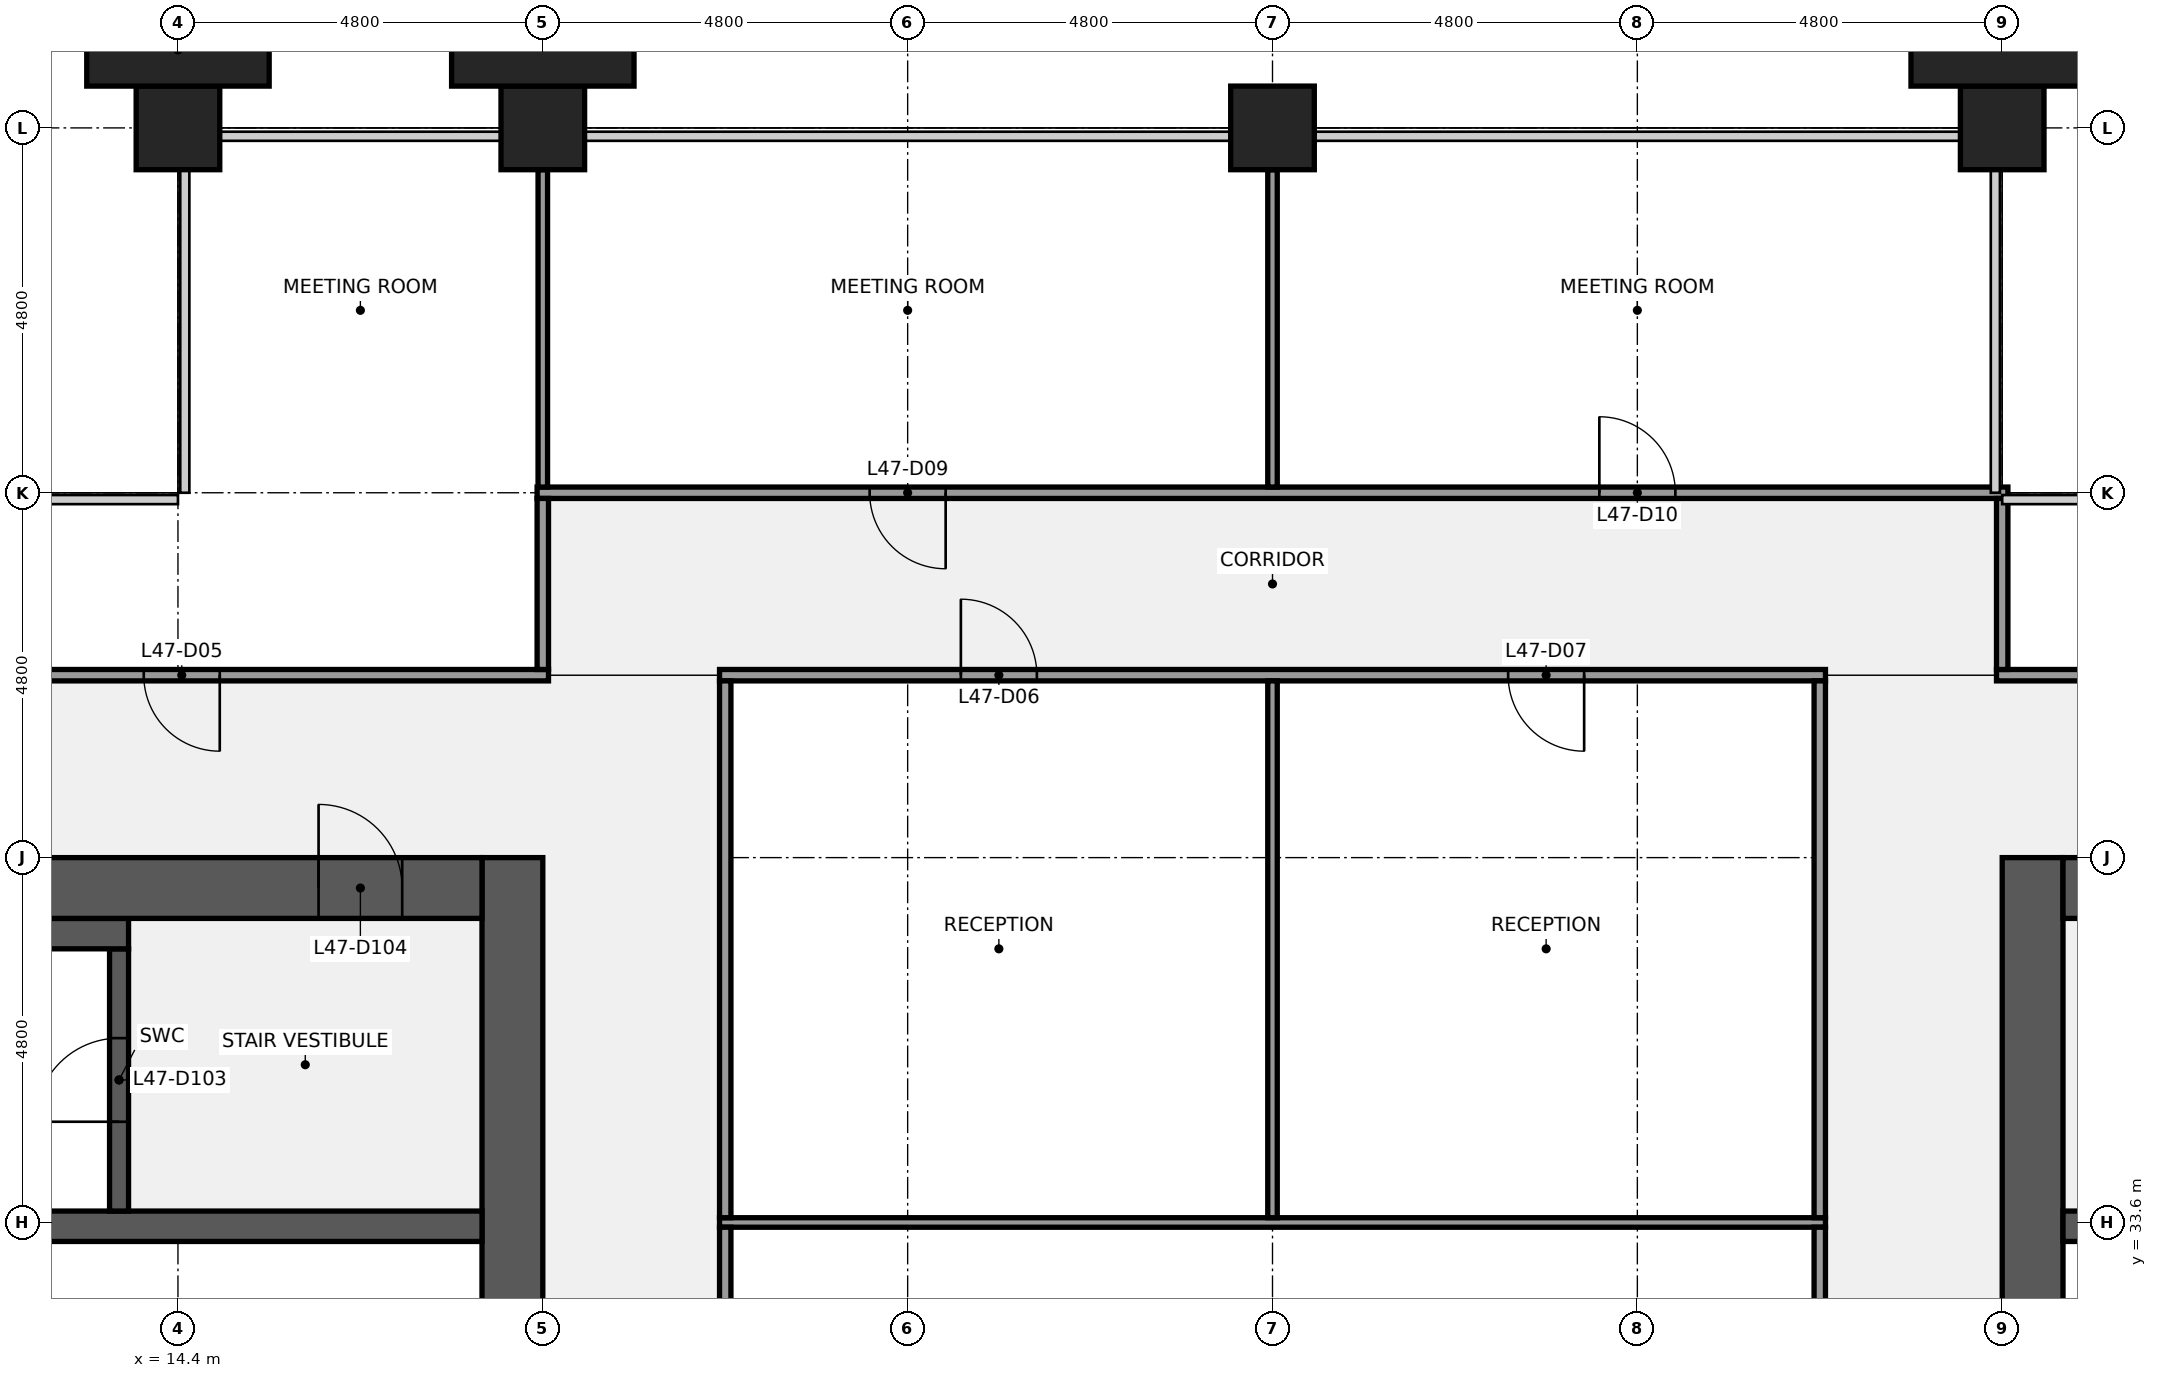
"""IFC4 building model, lengths in metres.
Left out: names, types, materials, properties, quantities, classifications, styles, units other than length and angle.
Written with IfcOpenShell. Run it as: python <this file> out.ifc"""

import sys

from ifc_helpers import new_model, si_unit, direction, frame, frame_2d, origin, origin_2d, place, context, subcontext, project, spatial, rectangle, extrude, element, fill, save


model = new_model("IFC4")
c1 = context("Model", 3, precision=1e-05, world=origin(), true_north=direction((0.0, 1.0)))
c2 = subcontext(c1, "Body", "Model", "MODEL_VIEW")
j1 = project(units=[si_unit("LENGTHUNIT", "METRE"), si_unit("PLANEANGLEUNIT", "RADIAN")], contexts=[c1])
p1 = place(None, origin())
s1 = spatial("IfcSite", under=j1, at=p1, CompositionType="ELEMENT")
p2 = place(p1, origin())
s2 = spatial("IfcBuilding", under=s1, at=p2, CompositionType="ELEMENT")
p3 = place(p2, frame((0.0, 0.0, 217.2)))
s3 = spatial("IfcBuildingStorey", under=s2, at=p3, CompositionType="ELEMENT", Elevation=217.2)
for number, where, z_axis, x_axis in (
    (1, (14.4, 48.0, 0.0), (0.0, 0.0, 1.0), (1.0, 0.0, 0.0)),
    (2, (19.2, 48.0, 0.0), (0.0, 0.0, 1.0), (1.0, 0.0, 0.0)),
    (3, (28.8, 48.0, 0.0), (0.0, 0.0, 1.0), (1.0, 0.0, 0.0)),
    (4, (38.4, 48.0, 0.0), (0.0, 0.0, 1.0), (1.0, 0.0, 0.0)),
):
    element("IfcColumn", number, at=place(p3, frame(where, z_axis=z_axis, x_axis=x_axis)), inside=s3, PredefinedType="COLUMN", context=c2, shape_type="SweptSolid", body=[
        extrude(rectangle(XDim=1.1, YDim=1.1, at=origin_2d()), origin(), (0.0, 0.0, 1.0), 4.0),
    ])
p4 = place(p3, frame((18.8, 38.4, 0.0), z_axis=(0.0, 0.0, 1.0), x_axis=(0.0, -1.0, 0.0)))
e5 = element("IfcWall", 5, at=p4, inside=s3, PredefinedType="SHEAR", context=c2, shape_type="SweptSolid", body=[
    extrude(rectangle(XDim=28.8, YDim=0.8, at=frame_2d((14.4, 0.0))), origin(), (0.0, 0.0, 1.0), 3.84),
])
p5 = place(p4, frame((18.3, 0.0, 0.0)))
e6 = element("IfcOpeningElement", 6, at=p5, cuts=e5, PredefinedType="OPENING", context=c2, shape_type="SweptSolid", body=[
    extrude(rectangle(XDim=1.8, YDim=2.1, at=frame_2d((0.9, 1.05))), frame((0.0, 0.41, 0.0), z_axis=(0.0, -1.0, 0.0), x_axis=(1.0, 0.0, 0.0)), (0.0, 0.0, 1.0), 0.82),
])
p6 = place(p4, frame((8.7, 0.0, 0.0)))
e7 = element("IfcOpeningElement", 7, at=p6, cuts=e5, PredefinedType="OPENING", context=c2, shape_type="SweptSolid", body=[
    extrude(rectangle(XDim=1.8, YDim=2.1, at=frame_2d((0.9, 1.05))), frame((0.0, 0.41, 0.0), z_axis=(0.0, -1.0, 0.0), x_axis=(1.0, 0.0, 0.0)), (0.0, 0.0, 1.0), 0.82),
])
p7 = place(p3, frame((0.8, 33.55, 0.0), z_axis=(0.0, 0.0, 1.0), x_axis=(1.0, 0.0, 0.0)))
e8 = element("IfcWall", 8, at=p7, inside=s3, PredefinedType="SHEAR", context=c2, shape_type="SweptSolid", body=[
    extrude(rectangle(XDim=17.6, YDim=0.4, at=frame_2d((8.8, 0.0))), origin(), (0.0, 0.0, 1.0), 3.84),
])
p8 = place(p3, frame((13.625, 33.75, 0.0), z_axis=(0.0, 0.0, 1.0), x_axis=(0.0, 1.0, 0.0)))
e9 = element("IfcWall", 9, at=p8, inside=s3, PredefinedType="SHEAR", context=c2, shape_type="SweptSolid", body=[
    extrude(rectangle(XDim=3.45, YDim=0.25, at=frame_2d((1.725, 0.0))), origin(), (0.0, 0.0, 1.0), 3.84),
])
p9 = place(p8, frame((1.175, 0.0, 0.0)))
e10 = element("IfcOpeningElement", 10, at=p9, cuts=e9, PredefinedType="OPENING", context=c2, shape_type="SweptSolid", body=[
    extrude(rectangle(XDim=1.1, YDim=2.1, at=frame_2d((0.55, 1.05))), frame((0.0, 0.135, 0.0), z_axis=(0.0, -1.0, 0.0), x_axis=(1.0, 0.0, 0.0)), (0.0, 0.0, 1.0), 0.27),
])
p10 = place(p3, frame((9.6, 37.4, 0.0), z_axis=(0.0, 0.0, 1.0), x_axis=(1.0, 0.0, 0.0)))
e11 = element("IfcWall", 11, at=p10, inside=s3, PredefinedType="SHEAR", context=c2, shape_type="SweptSolid", body=[
    extrude(rectangle(XDim=4.15, YDim=0.4, at=frame_2d((2.075, 0.0))), origin(), (0.0, 0.0, 1.0), 3.84),
])
p11 = place(p3, frame((9.6, 38.0, 0.0), z_axis=(0.0, 0.0, 1.0), x_axis=(1.0, 0.0, 0.0)))
e12 = element("IfcWall", 12, at=p11, inside=s3, PredefinedType="SHEAR", context=c2, shape_type="SweptSolid", body=[
    extrude(rectangle(XDim=8.8, YDim=0.8, at=frame_2d((4.4, 0.0))), origin(), (0.0, 0.0, 1.0), 3.84),
])
p12 = place(p11, frame((6.65, 0.0, 0.0)))
e13 = element("IfcOpeningElement", 13, at=p12, cuts=e12, PredefinedType="OPENING", context=c2, shape_type="SweptSolid", body=[
    extrude(rectangle(XDim=1.1, YDim=2.1, at=frame_2d((0.55, 1.05))), frame((0.0, 0.41, 0.0), z_axis=(0.0, -1.0, 0.0), x_axis=(1.0, 0.0, 0.0)), (0.0, 0.0, 1.0), 0.82),
])
p13 = place(p3, frame((38.8, 9.6, 0.0), z_axis=(0.0, 0.0, 1.0), x_axis=(0.0, 1.0, 0.0)))
e14 = element("IfcWall", 14, at=p13, inside=s3, PredefinedType="SHEAR", context=c2, shape_type="SweptSolid", body=[
    extrude(rectangle(XDim=28.8, YDim=0.8, at=frame_2d((14.4, 0.0))), origin(), (0.0, 0.0, 1.0), 3.84),
])
p14 = place(p13, frame((8.7, 0.0, 0.0)))
e15 = element("IfcOpeningElement", 15, at=p14, cuts=e14, PredefinedType="OPENING", context=c2, shape_type="SweptSolid", body=[
    extrude(rectangle(XDim=1.8, YDim=2.1, at=frame_2d((0.9, 1.05))), frame((0.0, 0.41, 0.0), z_axis=(0.0, -1.0, 0.0), x_axis=(1.0, 0.0, 0.0)), (0.0, 0.0, 1.0), 0.82),
])
p15 = place(p13, frame((18.3, 0.0, 0.0)))
e16 = element("IfcOpeningElement", 16, at=p15, cuts=e14, PredefinedType="OPENING", context=c2, shape_type="SweptSolid", body=[
    extrude(rectangle(XDim=1.8, YDim=2.1, at=frame_2d((0.9, 1.05))), frame((0.0, 0.41, 0.0), z_axis=(0.0, -1.0, 0.0), x_axis=(1.0, 0.0, 0.0)), (0.0, 0.0, 1.0), 0.82),
])
p16 = place(p3, frame((39.2, 33.55, 0.0), z_axis=(0.0, 0.0, 1.0), x_axis=(1.0, 0.0, 0.0)))
e17 = element("IfcWall", 17, at=p16, inside=s3, PredefinedType="SHEAR", context=c2, shape_type="SweptSolid", body=[
    extrude(rectangle(XDim=17.6, YDim=0.4, at=frame_2d((8.8, 0.0))), origin(), (0.0, 0.0, 1.0), 3.84),
])
p17 = place(p3, frame((39.2, 38.0, 0.0), z_axis=(0.0, 0.0, 1.0), x_axis=(1.0, 0.0, 0.0)))
e18 = element("IfcWall", 18, at=p17, inside=s3, PredefinedType="SHEAR", context=c2, shape_type="SweptSolid", body=[
    extrude(rectangle(XDim=8.8, YDim=0.8, at=frame_2d((4.4, 0.0))), origin(), (0.0, 0.0, 1.0), 3.84),
])
p18 = place(p17, frame((1.05, 0.0, 0.0)))
e19 = element("IfcOpeningElement", 19, at=p18, cuts=e18, PredefinedType="OPENING", context=c2, shape_type="SweptSolid", body=[
    extrude(rectangle(XDim=1.1, YDim=2.1, at=frame_2d((0.55, 1.05))), frame((0.0, 0.41, 0.0), z_axis=(0.0, -1.0, 0.0), x_axis=(1.0, 0.0, 0.0)), (0.0, 0.0, 1.0), 0.82),
])
p19 = place(p3, frame((21.525, 33.6, 0.0), z_axis=(0.0, 0.0, 1.0), x_axis=(1.0, 0.0, 0.0)))
e20 = element("IfcWall", 20, at=p19, inside=s3, PredefinedType="PARTITIONING", context=c2, shape_type="SweptSolid", body=[
    extrude(rectangle(XDim=14.55, YDim=0.125, at=frame_2d((7.275, 0.0))), origin(), (0.0, 0.0, 1.0), 2.849),
])
p20 = place(p3, frame((9.7, 40.8, 0.0), z_axis=(0.0, 0.0, 1.0), x_axis=(1.0, 0.0, 0.0)))
e21 = element("IfcWall", 21, at=p20, inside=s3, PredefinedType="PARTITIONING", context=c2, shape_type="SweptSolid", body=[
    extrude(rectangle(XDim=9.575, YDim=0.15, at=frame_2d((4.788, 0.0))), origin(), (0.0, 0.0, 1.0), 2.849),
])
p21 = place(p20, frame((4.25, 0.0, 0.0)))
e22 = element("IfcOpeningElement", 22, at=p21, cuts=e21, PredefinedType="OPENING", context=c2, shape_type="SweptSolid", body=[
    extrude(rectangle(XDim=1.0, YDim=2.1, at=frame_2d((0.5, 1.05))), frame((0.0, 0.085, 0.0), z_axis=(0.0, -1.0, 0.0), x_axis=(1.0, 0.0, 0.0)), (0.0, 0.0, 1.0), 0.17),
])
p22 = place(p3, frame((21.525, 40.8, 0.0), z_axis=(0.0, 0.0, 1.0), x_axis=(1.0, 0.0, 0.0)))
e23 = element("IfcWall", 23, at=p22, inside=s3, PredefinedType="PARTITIONING", context=c2, shape_type="SweptSolid", body=[
    extrude(rectangle(XDim=14.55, YDim=0.15, at=frame_2d((7.275, 0.0))), origin(), (0.0, 0.0, 1.0), 2.849),
])
p23 = place(p22, frame((3.175, 0.0, 0.0)))
e24 = element("IfcOpeningElement", 24, at=p23, cuts=e23, PredefinedType="OPENING", context=c2, shape_type="SweptSolid", body=[
    extrude(rectangle(XDim=1.0, YDim=2.1, at=frame_2d((0.5, 1.05))), frame((0.0, 0.085, 0.0), z_axis=(0.0, -1.0, 0.0), x_axis=(1.0, 0.0, 0.0)), (0.0, 0.0, 1.0), 0.17),
])
p24 = place(p22, frame((10.375, 0.0, 0.0)))
e25 = element("IfcOpeningElement", 25, at=p24, cuts=e23, PredefinedType="OPENING", context=c2, shape_type="SweptSolid", body=[
    extrude(rectangle(XDim=1.0, YDim=2.1, at=frame_2d((0.5, 1.05))), frame((0.0, 0.085, 0.0), z_axis=(0.0, -1.0, 0.0), x_axis=(1.0, 0.0, 0.0)), (0.0, 0.0, 1.0), 0.17),
])
p25 = place(p3, frame((38.325, 40.8, 0.0), z_axis=(0.0, 0.0, 1.0), x_axis=(1.0, 0.0, 0.0)))
e26 = element("IfcWall", 26, at=p25, inside=s3, PredefinedType="PARTITIONING", context=c2, shape_type="SweptSolid", body=[
    extrude(rectangle(XDim=9.575, YDim=0.15, at=frame_2d((4.788, 0.0))), origin(), (0.0, 0.0, 1.0), 2.849),
])
p26 = place(p25, frame((4.325, 0.0, 0.0)))
e27 = element("IfcOpeningElement", 27, at=p26, cuts=e26, PredefinedType="OPENING", context=c2, shape_type="SweptSolid", body=[
    extrude(rectangle(XDim=1.0, YDim=2.1, at=frame_2d((0.5, 1.05))), frame((0.0, 0.085, 0.0), z_axis=(0.0, -1.0, 0.0), x_axis=(1.0, 0.0, 0.0)), (0.0, 0.0, 1.0), 0.17),
])
p27 = place(p3, frame((19.125, 43.2, 0.0), z_axis=(0.0, 0.0, 1.0), x_axis=(1.0, 0.0, 0.0)))
e28 = element("IfcWall", 28, at=p27, inside=s3, PredefinedType="PARTITIONING", context=c2, shape_type="SweptSolid", body=[
    extrude(rectangle(XDim=19.35, YDim=0.15, at=frame_2d((9.675, 0.0))), origin(), (0.0, 0.0, 1.0), 2.849),
])
p28 = place(p27, frame((4.375, 0.0, 0.0)))
e29 = element("IfcOpeningElement", 29, at=p28, cuts=e28, PredefinedType="OPENING", context=c2, shape_type="SweptSolid", body=[
    extrude(rectangle(XDim=1.0, YDim=2.1, at=frame_2d((0.5, 1.05))), frame((0.0, 0.085, 0.0), z_axis=(0.0, -1.0, 0.0), x_axis=(1.0, 0.0, 0.0)), (0.0, 0.0, 1.0), 0.17),
])
p29 = place(p27, frame((13.975, 0.0, 0.0)))
e30 = element("IfcOpeningElement", 30, at=p29, cuts=e28, PredefinedType="OPENING", context=c2, shape_type="SweptSolid", body=[
    extrude(rectangle(XDim=1.0, YDim=2.1, at=frame_2d((0.5, 1.05))), frame((0.0, 0.085, 0.0), z_axis=(0.0, -1.0, 0.0), x_axis=(1.0, 0.0, 0.0)), (0.0, 0.0, 1.0), 0.17),
])
p30 = place(p3, frame((19.2, 43.275, 0.0), z_axis=(0.0, 0.0, 1.0), x_axis=(0.0, 1.0, 0.0)))
e31 = element("IfcWall", 31, at=p30, inside=s3, PredefinedType="PARTITIONING", context=c2, shape_type="SweptSolid", body=[
    extrude(rectangle(XDim=4.175, YDim=0.125, at=frame_2d((2.087, 0.0))), origin(), (0.0, 0.0, 1.0), 2.849),
])
p31 = place(p3, frame((19.2, 40.875, 0.0), z_axis=(0.0, 0.0, 1.0), x_axis=(0.0, 1.0, 0.0)))
e32 = element("IfcWall", 32, at=p31, inside=s3, PredefinedType="PARTITIONING", context=c2, shape_type="SweptSolid", body=[
    extrude(rectangle(XDim=2.25, YDim=0.15, at=frame_2d((1.125, 0.0))), origin(), (0.0, 0.0, 1.0), 2.849),
])
p32 = place(p3, frame((21.6, 24.062, 0.0), z_axis=(0.0, 0.0, 1.0), x_axis=(0.0, 1.0, 0.0)))
e33 = element("IfcWall", 33, at=p32, inside=s3, PredefinedType="PARTITIONING", context=c2, shape_type="SweptSolid", body=[
    extrude(rectangle(XDim=9.475, YDim=0.15, at=frame_2d((4.738, 0.0))), origin(), (0.0, 0.0, 1.0), 2.849),
])
p33 = place(p32, frame((4.238, 0.0, 0.0)))
e34 = element("IfcOpeningElement", 34, at=p33, cuts=e33, PredefinedType="OPENING", context=c2, shape_type="SweptSolid", body=[
    extrude(rectangle(XDim=1.0, YDim=2.1, at=frame_2d((0.5, 1.05))), frame((0.0, 0.085, 0.0), z_axis=(0.0, -1.0, 0.0), x_axis=(1.0, 0.0, 0.0)), (0.0, 0.0, 1.0), 0.17),
])
p34 = place(p3, frame((21.6, 33.663, 0.0), z_axis=(0.0, 0.0, 1.0), x_axis=(0.0, 1.0, 0.0)))
e35 = element("IfcWall", 35, at=p34, inside=s3, PredefinedType="PARTITIONING", context=c2, shape_type="SweptSolid", body=[
    extrude(rectangle(XDim=7.062, YDim=0.15, at=frame_2d((3.531, 0.0))), origin(), (0.0, 0.0, 1.0), 2.849),
])
p35 = place(p3, frame((28.8, 33.663, 0.0), z_axis=(0.0, 0.0, 1.0), x_axis=(0.0, 1.0, 0.0)))
e36 = element("IfcWall", 36, at=p35, inside=s3, PredefinedType="PARTITIONING", context=c2, shape_type="SweptSolid", body=[
    extrude(rectangle(XDim=7.062, YDim=0.125, at=frame_2d((3.531, 0.0))), origin(), (0.0, 0.0, 1.0), 2.849),
])
p36 = place(p3, frame((28.8, 43.275, 0.0), z_axis=(0.0, 0.0, 1.0), x_axis=(0.0, 1.0, 0.0)))
e37 = element("IfcWall", 37, at=p36, inside=s3, PredefinedType="PARTITIONING", context=c2, shape_type="SweptSolid", body=[
    extrude(rectangle(XDim=4.175, YDim=0.125, at=frame_2d((2.087, 0.0))), origin(), (0.0, 0.0, 1.0), 2.849),
])
p37 = place(p3, frame((36.0, 24.062, 0.0), z_axis=(0.0, 0.0, 1.0), x_axis=(0.0, 1.0, 0.0)))
e38 = element("IfcWall", 38, at=p37, inside=s3, PredefinedType="PARTITIONING", context=c2, shape_type="SweptSolid", body=[
    extrude(rectangle(XDim=9.475, YDim=0.15, at=frame_2d((4.738, 0.0))), origin(), (0.0, 0.0, 1.0), 2.849),
])
p38 = place(p3, frame((36.0, 33.663, 0.0), z_axis=(0.0, 0.0, 1.0), x_axis=(0.0, 1.0, 0.0)))
e39 = element("IfcWall", 39, at=p38, inside=s3, PredefinedType="PARTITIONING", context=c2, shape_type="SweptSolid", body=[
    extrude(rectangle(XDim=7.062, YDim=0.15, at=frame_2d((3.531, 0.0))), origin(), (0.0, 0.0, 1.0), 2.849),
])
p39 = place(p3, frame((38.4, 40.875, 0.0), z_axis=(0.0, 0.0, 1.0), x_axis=(0.0, 1.0, 0.0)))
e40 = element("IfcWall", 40, at=p39, inside=s3, PredefinedType="PARTITIONING", context=c2, shape_type="SweptSolid", body=[
    extrude(rectangle(XDim=2.25, YDim=0.15, at=frame_2d((1.125, 0.0))), origin(), (0.0, 0.0, 1.0), 2.849),
])
for number, where, z_axis, x_axis in (
    (41, (14.4, 49.025, 0.0), (0.0, 0.0, 1.0), (1.0, 0.0, 0.0)),
    (42, (19.2, 49.025, 0.0), (0.0, 0.0, 1.0), (1.0, 0.0, 0.0)),
    (43, (38.4, 49.025, 0.0), (0.0, 0.0, 1.0), (1.0, 0.0, 0.0)),
):
    element("IfcColumn", number, at=place(p3, frame(where, z_axis=z_axis, x_axis=x_axis)), inside=s3, PredefinedType="PILASTER", context=c2, shape_type="SweptSolid", body=[
        extrude(rectangle(XDim=2.4, YDim=0.95, at=origin_2d()), origin(), (0.0, 0.0, 1.0), 4.0),
    ])
p40 = place(p9, origin())
e44 = element("IfcDoor", 44, at=p40, inside=s3, OperationType="SINGLE_SWING_LEFT", PredefinedType="DOOR", context=c2, shape_type="SweptSolid", body=[
    extrude(rectangle(XDim=1.1, YDim=2.1, at=frame_2d((0.55, 1.05))), frame((0.0, 0.025, 0.0), z_axis=(0.0, -1.0, 0.0), x_axis=(1.0, 0.0, 0.0)), (0.0, 0.0, 1.0), 0.05),
])
fill(e10, e44)
p41 = place(p12, origin())
e45 = element("IfcDoor", 45, at=p41, inside=s3, OperationType="SINGLE_SWING_LEFT", PredefinedType="DOOR", context=c2, shape_type="SweptSolid", body=[
    extrude(rectangle(XDim=1.1, YDim=2.1, at=frame_2d((0.55, 1.05))), frame((0.0, 0.025, 0.0), z_axis=(0.0, -1.0, 0.0), x_axis=(1.0, 0.0, 0.0)), (0.0, 0.0, 1.0), 0.05),
])
fill(e13, e45)
p42 = place(p21, origin())
e46 = element("IfcDoor", 46, at=p42, inside=s3, OperationType="SINGLE_SWING_RIGHT", PredefinedType="DOOR", context=c2, shape_type="SweptSolid", body=[
    extrude(rectangle(XDim=1.0, YDim=2.1, at=frame_2d((0.5, 1.05))), frame((0.0, 0.025, 0.0), z_axis=(0.0, -1.0, 0.0), x_axis=(1.0, 0.0, 0.0)), (0.0, 0.0, 1.0), 0.05),
])
fill(e22, e46)
p43 = place(p23, origin())
e47 = element("IfcDoor", 47, at=p43, inside=s3, OperationType="SINGLE_SWING_LEFT", PredefinedType="DOOR", context=c2, shape_type="SweptSolid", body=[
    extrude(rectangle(XDim=1.0, YDim=2.1, at=frame_2d((0.5, 1.05))), frame((0.0, 0.025, 0.0), z_axis=(0.0, -1.0, 0.0), x_axis=(1.0, 0.0, 0.0)), (0.0, 0.0, 1.0), 0.05),
])
fill(e24, e47)
p44 = place(p24, origin())
e48 = element("IfcDoor", 48, at=p44, inside=s3, OperationType="SINGLE_SWING_RIGHT", PredefinedType="DOOR", context=c2, shape_type="SweptSolid", body=[
    extrude(rectangle(XDim=1.0, YDim=2.1, at=frame_2d((0.5, 1.05))), frame((0.0, 0.025, 0.0), z_axis=(0.0, -1.0, 0.0), x_axis=(1.0, 0.0, 0.0)), (0.0, 0.0, 1.0), 0.05),
])
fill(e25, e48)
p45 = place(p28, origin())
e49 = element("IfcDoor", 49, at=p45, inside=s3, OperationType="SINGLE_SWING_RIGHT", PredefinedType="DOOR", context=c2, shape_type="SweptSolid", body=[
    extrude(rectangle(XDim=1.0, YDim=2.1, at=frame_2d((0.5, 1.05))), frame((0.0, 0.025, 0.0), z_axis=(0.0, -1.0, 0.0), x_axis=(1.0, 0.0, 0.0)), (0.0, 0.0, 1.0), 0.05),
])
fill(e29, e49)
p46 = place(p29, origin())
e50 = element("IfcDoor", 50, at=p46, inside=s3, OperationType="SINGLE_SWING_LEFT", PredefinedType="DOOR", context=c2, shape_type="SweptSolid", body=[
    extrude(rectangle(XDim=1.0, YDim=2.1, at=frame_2d((0.5, 1.05))), frame((0.0, 0.025, 0.0), z_axis=(0.0, -1.0, 0.0), x_axis=(1.0, 0.0, 0.0)), (0.0, 0.0, 1.0), 0.05),
])
fill(e30, e50)
save(model, sys.argv[1])
